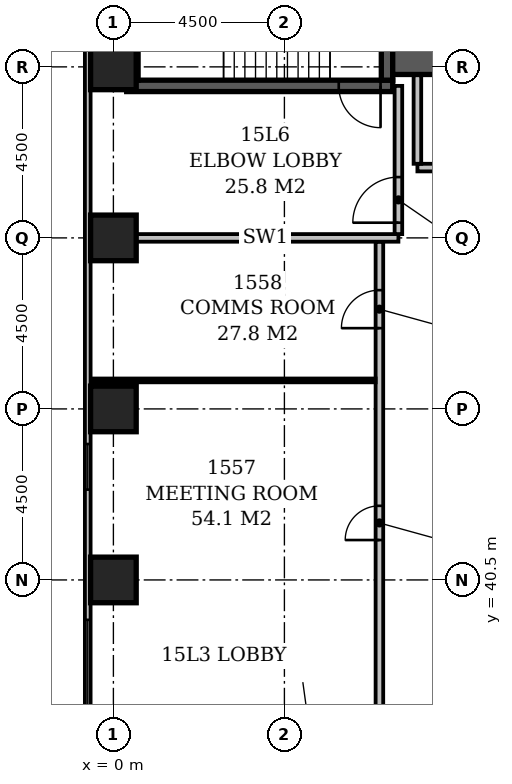
"""IFC4 building model, lengths in metres.
Left out: names, types, materials, properties, quantities, classifications, styles, units other than length and angle.
Written with IfcOpenShell. Run it as: python <this file> out.ifc"""

import sys

from ifc_helpers import new_model, si_unit, direction, frame, frame_2d, origin, origin_2d, place, context, subcontext, project, spatial, rectangle, extrude, element, fill, save


model = new_model("IFC4")
c1 = context("Model", 3, precision=1e-05, world=origin(), true_north=direction((0.0, 1.0)))
c2 = subcontext(c1, "Body", "Model", "MODEL_VIEW")
j1 = project(units=[si_unit("LENGTHUNIT", "METRE"), si_unit("PLANEANGLEUNIT", "RADIAN")], contexts=[c1])
p1 = place(None, origin())
s1 = spatial("IfcSite", under=j1, at=p1, CompositionType="ELEMENT")
p2 = place(p1, origin())
s2 = spatial("IfcBuilding", under=s1, at=p2, CompositionType="ELEMENT")
p3 = place(p2, frame((0.0, 0.0, 65.0)))
s3 = spatial("IfcBuildingStorey", under=s2, at=p3, CompositionType="ELEMENT", Elevation=65.0)
p4 = place(p3, frame((0.35, 53.5, -0.3), z_axis=(0.0, 0.0, 1.0), x_axis=(1.0, 0.0, 0.0)))
e1 = element("IfcWall", 1, at=p4, inside=s3, PredefinedType="SHEAR", context=c2, shape_type="SweptSolid", body=[
    extrude(rectangle(XDim=7.0, YDim=0.3, at=frame_2d((3.5, 0.0))), origin(), (0.0, 0.0, 1.0), 3.6),
])
p5 = place(p4, frame((5.58, 0.0, 0.3)))
e2 = element("IfcOpeningElement", 2, at=p5, cuts=e1, PredefinedType="OPENING", context=c2, shape_type="SweptSolid", body=[
    extrude(rectangle(XDim=1.1, YDim=2.1, at=frame_2d((0.55, 1.05))), frame((0.0, 0.162, 0.0), z_axis=(0.0, -1.0, 0.0), x_axis=(1.0, 0.0, 0.0)), (0.0, 0.0, 1.0), 0.324),
])
for number, where, z_axis, x_axis in (
    (3, (0.5, 53.65, -0.3), (0.0, 0.0, 1.0), (0.0, 1.0, 0.0)),
    (4, (7.2, 53.65, -0.3), (0.0, 0.0, 1.0), (0.0, 1.0, 0.0)),
):
    element("IfcWall", number, at=place(p3, frame(where, z_axis=z_axis, x_axis=x_axis)), inside=s3, PredefinedType="SHEAR", context=c2, shape_type="SweptSolid", body=[
        extrude(rectangle(XDim=4.2, YDim=0.3, at=frame_2d((2.1, 0.0))), origin(), (0.0, 0.0, 1.0), 3.6),
    ])
p6 = place(p3, frame((7.35, 54.2, -0.3), z_axis=(0.0, 0.0, 1.0), x_axis=(1.0, 0.0, 0.0)))
e5 = element("IfcWall", 5, at=p6, inside=s3, PredefinedType="SHEAR", context=c2, shape_type="SweptSolid", body=[
    extrude(rectangle(XDim=16.45, YDim=0.8, at=frame_2d((8.225, 0.0))), origin(), (0.0, 0.0, 1.0), 3.6),
])
p7 = place(p6, frame((1.35, 0.0, 0.3)))
e6 = element("IfcOpeningElement", 6, at=p7, cuts=e5, PredefinedType="OPENING", context=c2, shape_type="SweptSolid", body=[
    extrude(rectangle(XDim=1.1, YDim=2.1, at=frame_2d((0.55, 1.05))), frame((0.0, 0.412, 0.0), z_axis=(0.0, -1.0, 0.0), x_axis=(1.0, 0.0, 0.0)), (0.0, 0.0, 1.0), 0.824),
])
p8 = place(p6, frame((3.85, 0.0, 0.3)))
e7 = element("IfcOpeningElement", 7, at=p8, cuts=e5, PredefinedType="OPENING", context=c2, shape_type="SweptSolid", body=[
    extrude(rectangle(XDim=1.1, YDim=2.1, at=frame_2d((0.55, 1.05))), frame((0.0, 0.412, 0.0), z_axis=(0.0, -1.0, 0.0), x_axis=(1.0, 0.0, 0.0)), (0.0, 0.0, 1.0), 0.824),
])
p9 = place(p6, frame((6.35, 0.0, 0.3)))
e8 = element("IfcOpeningElement", 8, at=p9, cuts=e5, PredefinedType="OPENING", context=c2, shape_type="SweptSolid", body=[
    extrude(rectangle(XDim=1.1, YDim=2.1, at=frame_2d((0.55, 1.05))), frame((0.0, 0.412, 0.0), z_axis=(0.0, -1.0, 0.0), x_axis=(1.0, 0.0, 0.0)), (0.0, 0.0, 1.0), 0.824),
])
p10 = place(p6, frame((8.85, 0.0, 0.3)))
e9 = element("IfcOpeningElement", 9, at=p10, cuts=e5, PredefinedType="OPENING", context=c2, shape_type="SweptSolid", body=[
    extrude(rectangle(XDim=1.1, YDim=2.1, at=frame_2d((0.55, 1.05))), frame((0.0, 0.412, 0.0), z_axis=(0.0, -1.0, 0.0), x_axis=(1.0, 0.0, 0.0)), (0.0, 0.0, 1.0), 0.824),
])
p11 = place(p6, frame((11.35, 0.0, 0.3)))
e10 = element("IfcOpeningElement", 10, at=p11, cuts=e5, PredefinedType="OPENING", context=c2, shape_type="SweptSolid", body=[
    extrude(rectangle(XDim=1.1, YDim=2.1, at=frame_2d((0.55, 1.05))), frame((0.0, 0.412, 0.0), z_axis=(0.0, -1.0, 0.0), x_axis=(1.0, 0.0, 0.0)), (0.0, 0.0, 1.0), 0.824),
])
p12 = place(p6, frame((13.85, 0.0, 0.3)))
e11 = element("IfcOpeningElement", 11, at=p12, cuts=e5, PredefinedType="OPENING", context=c2, shape_type="SweptSolid", body=[
    extrude(rectangle(XDim=1.1, YDim=2.1, at=frame_2d((0.55, 1.05))), frame((0.0, 0.412, 0.0), z_axis=(0.0, -1.0, 0.0), x_axis=(1.0, 0.0, 0.0)), (0.0, 0.0, 1.0), 0.824),
])
for number, where, z_axis, x_axis in (
    (12, (0.0, 40.5, -0.3), (0.0, 0.0, 1.0), (1.0, 0.0, 0.0)),
    (13, (0.0, 45.0, -0.3), (0.0, 0.0, 1.0), (1.0, 0.0, 0.0)),
    (14, (0.0, 49.5, -0.3), (0.0, 0.0, 1.0), (1.0, 0.0, 0.0)),
    (15, (0.0, 54.0, -0.3), (0.0, 0.0, 1.0), (1.0, 0.0, 0.0)),
):
    element("IfcColumn", number, at=place(p3, frame(where, z_axis=z_axis, x_axis=x_axis)), inside=s3, PredefinedType="COLUMN", context=c2, shape_type="SweptSolid", body=[
        extrude(rectangle(XDim=1.2, YDim=1.2, at=origin_2d()), origin(), (0.0, 0.0, 1.0), 3.6),
    ])
p13 = place(p3, frame((-0.675, 59.1, 0.0), z_axis=(0.0, 0.0, 1.0), x_axis=(0.0, -1.0, 0.0)))
e16 = element("IfcWall", 16, at=p13, inside=s3, PredefinedType="STANDARD", context=c2, shape_type="SweptSolid", body=[
    extrude(rectangle(XDim=55.35, YDim=0.15, at=frame_2d((27.675, 0.0))), origin(), (0.0, 0.0, 1.0), 2.7),
])
p14 = place(p13, frame((15.023, 0.0, 0.6)))
e17 = element("IfcOpeningElement", 17, at=p14, cuts=e16, PredefinedType="OPENING", context=c2, shape_type="SweptSolid", body=[
    extrude(rectangle(XDim=1.2, YDim=1.8, at=frame_2d((0.6, 0.9))), frame((0.0, 0.087, 0.0), z_axis=(0.0, -1.0, 0.0), x_axis=(1.0, 0.0, 0.0)), (0.0, 0.0, 1.0), 0.174),
])
p15 = place(p13, frame((19.65, 0.0, 0.6)))
e18 = element("IfcOpeningElement", 18, at=p15, cuts=e16, PredefinedType="OPENING", context=c2, shape_type="SweptSolid", body=[
    extrude(rectangle(XDim=2.4, YDim=1.8, at=frame_2d((1.2, 0.9))), frame((0.0, 0.087, 0.0), z_axis=(0.0, -1.0, 0.0), x_axis=(1.0, 0.0, 0.0)), (0.0, 0.0, 1.0), 0.174),
])
p16 = place(p13, frame((42.023, 0.0, 0.6)))
e19 = element("IfcOpeningElement", 19, at=p16, cuts=e16, PredefinedType="OPENING", context=c2, shape_type="SweptSolid", body=[
    extrude(rectangle(XDim=1.2, YDim=1.8, at=frame_2d((0.6, 0.9))), frame((0.0, 0.087, 0.0), z_axis=(0.0, -1.0, 0.0), x_axis=(1.0, 0.0, 0.0)), (0.0, 0.0, 1.0), 0.174),
])
p17 = place(p3, frame((8.0, 51.35, 0.0), z_axis=(0.0, 0.0, 1.0), x_axis=(1.0, 0.0, 0.0)))
e20 = element("IfcWall", 20, at=p17, inside=s3, PredefinedType="PARTITIONING", context=c2, shape_type="SweptSolid", body=[
    extrude(rectangle(XDim=15.0, YDim=0.2, at=frame_2d((7.5, 0.0))), origin(), (0.0, 0.0, 1.0), 3.3),
])
p18 = place(p17, frame((3.4, 0.0, 0.0)))
e21 = element("IfcOpeningElement", 21, at=p18, cuts=e20, PredefinedType="OPENING", context=c2, shape_type="SweptSolid", body=[
    extrude(rectangle(XDim=1.2, YDim=2.1, at=frame_2d((0.6, 1.05))), frame((0.0, 0.112, 0.0), z_axis=(0.0, -1.0, 0.0), x_axis=(1.0, 0.0, 0.0)), (0.0, 0.0, 1.0), 0.224),
])
p19 = place(p17, frame((9.4, 0.0, 0.0)))
e22 = element("IfcOpeningElement", 22, at=p19, cuts=e20, PredefinedType="OPENING", context=c2, shape_type="SweptSolid", body=[
    extrude(rectangle(XDim=1.2, YDim=2.1, at=frame_2d((0.6, 1.05))), frame((0.0, 0.112, 0.0), z_axis=(0.0, -1.0, 0.0), x_axis=(1.0, 0.0, 0.0)), (0.0, 0.0, 1.0), 0.224),
])
p20 = place(p3, frame((8.0, 51.45, 0.0), z_axis=(0.0, 0.0, 1.0), x_axis=(0.0, 1.0, 0.0)))
e23 = element("IfcWall", 23, at=p20, inside=s3, PredefinedType="PARTITIONING", context=c2, shape_type="SweptSolid", body=[
    extrude(rectangle(XDim=2.33, YDim=0.2, at=frame_2d((1.165, 0.0))), origin(), (0.0, 0.0, 1.0), 3.3),
])
p21 = place(p3, frame((0.5, 49.5, 0.0), z_axis=(0.0, 0.0, 1.0), x_axis=(1.0, 0.0, 0.0)))
e24 = element("IfcWall", 24, at=p21, inside=s3, PredefinedType="PARTITIONING", context=c2, shape_type="SweptSolid", body=[
    extrude(rectangle(XDim=7.0, YDim=0.2, at=frame_2d((3.5, 0.0))), origin(), (0.0, 0.0, 1.0), 3.3),
])
p22 = place(p3, frame((7.5, 49.6, 0.0), z_axis=(0.0, 0.0, 1.0), x_axis=(0.0, 1.0, 0.0)))
e25 = element("IfcWall", 25, at=p22, inside=s3, PredefinedType="PARTITIONING", context=c2, shape_type="SweptSolid", body=[
    extrude(rectangle(XDim=3.9, YDim=0.2, at=frame_2d((1.95, 0.0))), origin(), (0.0, 0.0, 1.0), 3.3),
])
p23 = place(p22, frame((0.3, 0.0, 0.0)))
e26 = element("IfcOpeningElement", 26, at=p23, cuts=e25, PredefinedType="OPENING", context=c2, shape_type="SweptSolid", body=[
    extrude(rectangle(XDim=1.2, YDim=2.1, at=frame_2d((0.6, 1.05))), frame((0.0, 0.112, 0.0), z_axis=(0.0, -1.0, 0.0), x_axis=(1.0, 0.0, 0.0)), (0.0, 0.0, 1.0), 0.224),
])
p24 = place(p3, frame((7.0, 34.6, 0.0), z_axis=(0.0, 0.0, 1.0), x_axis=(0.0, 1.0, 0.0)))
e27 = element("IfcWall", 27, at=p24, inside=s3, PredefinedType="PARTITIONING", context=c2, shape_type="SweptSolid", body=[
    extrude(rectangle(XDim=14.8, YDim=0.2, at=frame_2d((7.4, 0.0))), origin(), (0.0, 0.0, 1.0), 3.3),
])
p25 = place(p24, frame((1.3, 0.0, 0.0)))
e28 = element("IfcOpeningElement", 28, at=p25, cuts=e27, PredefinedType="OPENING", context=c2, shape_type="SweptSolid", body=[
    extrude(rectangle(XDim=0.9, YDim=2.1, at=frame_2d((0.45, 1.05))), frame((0.0, 0.112, 0.0), z_axis=(0.0, -1.0, 0.0), x_axis=(1.0, 0.0, 0.0)), (0.0, 0.0, 1.0), 0.224),
])
p26 = place(p24, frame((6.95, 0.0, 0.0)))
e29 = element("IfcOpeningElement", 29, at=p26, cuts=e27, PredefinedType="OPENING", context=c2, shape_type="SweptSolid", body=[
    extrude(rectangle(XDim=0.9, YDim=2.1, at=frame_2d((0.45, 1.05))), frame((0.0, 0.112, 0.0), z_axis=(0.0, -1.0, 0.0), x_axis=(1.0, 0.0, 0.0)), (0.0, 0.0, 1.0), 0.224),
])
p27 = place(p24, frame((12.525, 0.0, 0.0)))
e30 = element("IfcOpeningElement", 30, at=p27, cuts=e27, PredefinedType="OPENING", context=c2, shape_type="SweptSolid", body=[
    extrude(rectangle(XDim=1.0, YDim=2.1, at=frame_2d((0.5, 1.05))), frame((0.0, 0.112, 0.0), z_axis=(0.0, -1.0, 0.0), x_axis=(1.0, 0.0, 0.0)), (0.0, 0.0, 1.0), 0.224),
])
p28 = place(p3, frame((-0.6, 45.75, 0.0), z_axis=(0.0, 0.0, 1.0), x_axis=(1.0, 0.0, 0.0)))
e31 = element("IfcWall", 31, at=p28, inside=s3, PredefinedType="PARTITIONING", context=c2, shape_type="SweptSolid", body=[
    extrude(rectangle(XDim=7.5, YDim=0.1, at=frame_2d((3.75, 0.0))), origin(), (0.0, 0.0, 1.0), 3.3),
])
p29 = place(p14, origin())
e32 = element("IfcWindow", 32, at=p29, inside=s3, PartitioningType="SINGLE_PANEL", PredefinedType="WINDOW", context=c2, shape_type="SweptSolid", body=[
    extrude(rectangle(XDim=1.2, YDim=1.8, at=frame_2d((0.6, 0.9))), frame((0.0, 0.03, 0.0), z_axis=(0.0, -1.0, 0.0), x_axis=(1.0, 0.0, 0.0)), (0.0, 0.0, 1.0), 0.06),
])
fill(e17, e32)
p30 = place(p15, origin())
e33 = element("IfcWindow", 33, at=p30, inside=s3, PartitioningType="SINGLE_PANEL", PredefinedType="WINDOW", context=c2, shape_type="SweptSolid", body=[
    extrude(rectangle(XDim=2.4, YDim=1.8, at=frame_2d((1.2, 0.9))), frame((0.0, 0.03, 0.0), z_axis=(0.0, -1.0, 0.0), x_axis=(1.0, 0.0, 0.0)), (0.0, 0.0, 1.0), 0.06),
])
fill(e18, e33)
p31 = place(p23, origin())
e34 = element("IfcDoor", 34, at=p31, inside=s3, OperationType="SINGLE_SWING_LEFT", PredefinedType="DOOR", context=c2, shape_type="SweptSolid", body=[
    extrude(rectangle(XDim=1.2, YDim=2.1, at=frame_2d((0.6, 1.05))), frame((0.0, 0.025, 0.0), z_axis=(0.0, -1.0, 0.0), x_axis=(1.0, 0.0, 0.0)), (0.0, 0.0, 1.0), 0.05),
])
fill(e26, e34)
p32 = place(p5, origin())
e35 = element("IfcDoor", 35, at=p32, inside=s3, OperationType="SINGLE_SWING_RIGHT", PredefinedType="DOOR", context=c2, shape_type="SweptSolid", body=[
    extrude(rectangle(XDim=1.1, YDim=2.1, at=frame_2d((0.55, 1.05))), frame((0.0, 0.025, 0.0), z_axis=(0.0, -1.0, 0.0), x_axis=(1.0, 0.0, 0.0)), (0.0, 0.0, 1.0), 0.05),
])
fill(e2, e35)
p33 = place(p26, origin())
e36 = element("IfcDoor", 36, at=p33, inside=s3, OperationType="SINGLE_SWING_LEFT", PredefinedType="DOOR", context=c2, shape_type="SweptSolid", body=[
    extrude(rectangle(XDim=0.9, YDim=2.1, at=frame_2d((0.45, 1.05))), frame((0.0, 0.025, 0.0), z_axis=(0.0, -1.0, 0.0), x_axis=(1.0, 0.0, 0.0)), (0.0, 0.0, 1.0), 0.05),
])
fill(e29, e36)
p34 = place(p27, origin())
e37 = element("IfcDoor", 37, at=p34, inside=s3, OperationType="SINGLE_SWING_LEFT", PredefinedType="DOOR", context=c2, shape_type="SweptSolid", body=[
    extrude(rectangle(XDim=1.0, YDim=2.1, at=frame_2d((0.5, 1.05))), frame((0.0, 0.025, 0.0), z_axis=(0.0, -1.0, 0.0), x_axis=(1.0, 0.0, 0.0)), (0.0, 0.0, 1.0), 0.05),
])
fill(e30, e37)
save(model, sys.argv[1])
